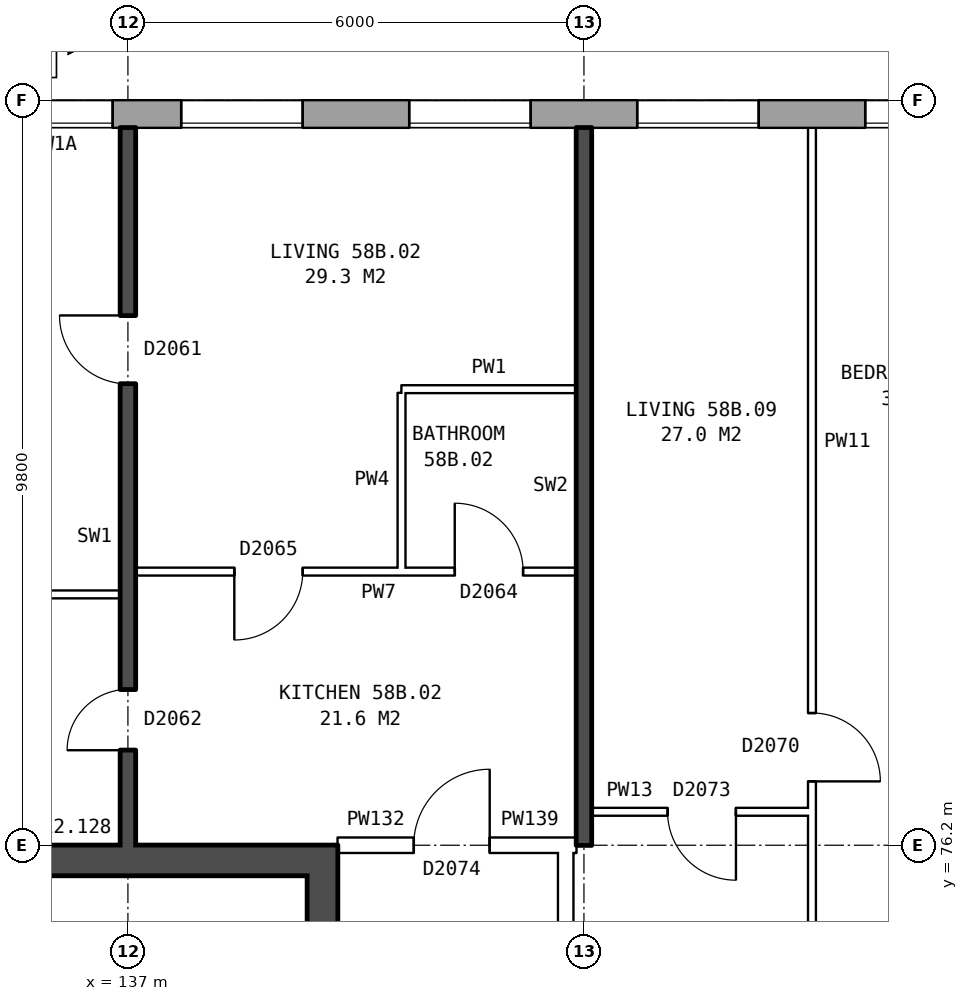
"""IFC4 building model, lengths in metres.
Left out: names, types, materials, properties, quantities, classifications, styles, units other than length and angle.
Written with IfcOpenShell. Run it as: python <this file> out.ifc"""

import sys

from ifc_helpers import new_model, si_unit, direction, frame, frame_2d, origin, place, context, subcontext, project, spatial, rectangle, extrude, element, fill, save


model = new_model("IFC4")
c1 = context("Model", 3, precision=1e-05, world=origin(), true_north=direction((0.0, 1.0)))
c2 = subcontext(c1, "Body", "Model", "MODEL_VIEW")
j1 = project(units=[si_unit("LENGTHUNIT", "METRE"), si_unit("PLANEANGLEUNIT", "RADIAN")], contexts=[c1])
p1 = place(None, origin())
s1 = spatial("IfcSite", under=j1, at=p1, CompositionType="ELEMENT")
p2 = place(p1, origin())
s2 = spatial("IfcBuilding", under=s1, at=p2, CompositionType="ELEMENT")
p3 = place(p2, frame((0.0, 0.0, 205.9)))
s3 = spatial("IfcBuildingStorey", under=s2, at=p3, CompositionType="ELEMENT", Elevation=205.9)
p4 = place(p3, frame((165.925, 85.82, 0.0), z_axis=(0.0, 0.0, 1.0), x_axis=(-1.0, 0.0, 0.0)))
e1 = element("IfcWall", 1, at=p4, inside=s3, PredefinedType="STANDARD", context=c2, shape_type="SweptSolid", body=[
    extrude(rectangle(XDim=33.875, YDim=0.36, at=frame_2d((16.938, 0.0))), origin(), (0.0, 0.0, 1.0), 2.85),
])
p5 = place(p4, frame((2.625, 0.0, 0.8)))
e2 = element("IfcOpeningElement", 2, at=p5, cuts=e1, PredefinedType="OPENING", context=c2, shape_type="SweptSolid", body=[
    extrude(rectangle(XDim=1.6, YDim=1.8, at=frame_2d((0.8, 0.9))), frame((0.0, 0.19, 0.0), z_axis=(0.0, -1.0, 0.0), x_axis=(1.0, 0.0, 0.0)), (0.0, 0.0, 1.0), 0.38),
])
p6 = place(p4, frame((5.625, 0.0, 0.8)))
e3 = element("IfcOpeningElement", 3, at=p6, cuts=e1, PredefinedType="OPENING", context=c2, shape_type="SweptSolid", body=[
    extrude(rectangle(XDim=1.6, YDim=1.8, at=frame_2d((0.8, 0.9))), frame((0.0, 0.19, 0.0), z_axis=(0.0, -1.0, 0.0), x_axis=(1.0, 0.0, 0.0)), (0.0, 0.0, 1.0), 0.38),
])
p7 = place(p4, frame((8.625, 0.0, 0.8)))
e4 = element("IfcOpeningElement", 4, at=p7, cuts=e1, PredefinedType="OPENING", context=c2, shape_type="SweptSolid", body=[
    extrude(rectangle(XDim=1.6, YDim=1.8, at=frame_2d((0.8, 0.9))), frame((0.0, 0.19, 0.0), z_axis=(0.0, -1.0, 0.0), x_axis=(1.0, 0.0, 0.0)), (0.0, 0.0, 1.0), 0.38),
])
p8 = place(p4, frame((11.625, 0.0, 0.8)))
e5 = element("IfcOpeningElement", 5, at=p8, cuts=e1, PredefinedType="OPENING", context=c2, shape_type="SweptSolid", body=[
    extrude(rectangle(XDim=1.6, YDim=1.8, at=frame_2d((0.8, 0.9))), frame((0.0, 0.19, 0.0), z_axis=(0.0, -1.0, 0.0), x_axis=(1.0, 0.0, 0.0)), (0.0, 0.0, 1.0), 0.38),
])
p9 = place(p4, frame((14.625, 0.0, 0.8)))
e6 = element("IfcOpeningElement", 6, at=p9, cuts=e1, PredefinedType="OPENING", context=c2, shape_type="SweptSolid", body=[
    extrude(rectangle(XDim=1.6, YDim=1.8, at=frame_2d((0.8, 0.9))), frame((0.0, 0.19, 0.0), z_axis=(0.0, -1.0, 0.0), x_axis=(1.0, 0.0, 0.0)), (0.0, 0.0, 1.0), 0.38),
])
p10 = place(p4, frame((17.625, 0.0, 0.8)))
e7 = element("IfcOpeningElement", 7, at=p10, cuts=e1, PredefinedType="OPENING", context=c2, shape_type="SweptSolid", body=[
    extrude(rectangle(XDim=1.6, YDim=1.8, at=frame_2d((0.8, 0.9))), frame((0.0, 0.19, 0.0), z_axis=(0.0, -1.0, 0.0), x_axis=(1.0, 0.0, 0.0)), (0.0, 0.0, 1.0), 0.38),
])
p11 = place(p4, frame((20.625, 0.0, 0.8)))
e8 = element("IfcOpeningElement", 8, at=p11, cuts=e1, PredefinedType="OPENING", context=c2, shape_type="SweptSolid", body=[
    extrude(rectangle(XDim=1.6, YDim=1.8, at=frame_2d((0.8, 0.9))), frame((0.0, 0.19, 0.0), z_axis=(0.0, -1.0, 0.0), x_axis=(1.0, 0.0, 0.0)), (0.0, 0.0, 1.0), 0.38),
])
p12 = place(p4, frame((23.625, 0.0, 0.8)))
e9 = element("IfcOpeningElement", 9, at=p12, cuts=e1, PredefinedType="OPENING", context=c2, shape_type="SweptSolid", body=[
    extrude(rectangle(XDim=1.6, YDim=1.8, at=frame_2d((0.8, 0.9))), frame((0.0, 0.19, 0.0), z_axis=(0.0, -1.0, 0.0), x_axis=(1.0, 0.0, 0.0)), (0.0, 0.0, 1.0), 0.38),
])
p13 = place(p4, frame((26.625, 0.0, 0.8)))
e10 = element("IfcOpeningElement", 10, at=p13, cuts=e1, PredefinedType="OPENING", context=c2, shape_type="SweptSolid", body=[
    extrude(rectangle(XDim=1.6, YDim=1.8, at=frame_2d((0.8, 0.9))), frame((0.0, 0.19, 0.0), z_axis=(0.0, -1.0, 0.0), x_axis=(1.0, 0.0, 0.0)), (0.0, 0.0, 1.0), 0.38),
])
p14 = place(p4, frame((29.125, 0.0, 0.8)))
e11 = element("IfcOpeningElement", 11, at=p14, cuts=e1, PredefinedType="OPENING", context=c2, shape_type="SweptSolid", body=[
    extrude(rectangle(XDim=1.4, YDim=1.8, at=frame_2d((0.7, 0.9))), frame((0.0, 0.19, 0.0), z_axis=(0.0, -1.0, 0.0), x_axis=(1.0, 0.0, 0.0)), (0.0, 0.0, 1.0), 0.38),
])
p15 = place(p4, frame((32.625, 0.0, 1.1)))
e12 = element("IfcOpeningElement", 12, at=p15, cuts=e1, PredefinedType="OPENING", context=c2, shape_type="SweptSolid", body=[
    extrude(rectangle(XDim=0.8, YDim=1.5, at=frame_2d((0.4, 0.75))), frame((0.0, 0.19, 0.0), z_axis=(0.0, -1.0, 0.0), x_axis=(1.0, 0.0, 0.0)), (0.0, 0.0, 1.0), 0.38),
])
p16 = place(p3, frame((139.56, 63.8, 0.0), z_axis=(0.0, 0.0, 1.0), x_axis=(0.0, 1.0, 0.0)))
e13 = element("IfcWall", 13, at=p16, inside=s3, PredefinedType="SHEAR", context=c2, shape_type="SweptSolid", body=[
    extrude(rectangle(XDim=12.4, YDim=0.4, at=frame_2d((6.2, 0.0))), origin(), (0.0, 0.0, 1.0), 2.85),
])
p17 = place(p16, frame((1.325, 0.0, 0.0)))
e14 = element("IfcOpeningElement", 14, at=p17, cuts=e13, PredefinedType="OPENING", context=c2, shape_type="SweptSolid", body=[
    extrude(rectangle(XDim=1.1, YDim=2.1, at=frame_2d((0.55, 1.05))), frame((0.0, 0.21, 0.0), z_axis=(0.0, -1.0, 0.0), x_axis=(1.0, 0.0, 0.0)), (0.0, 0.0, 1.0), 0.42),
])
p18 = place(p16, frame((3.6, 0.0, 0.0)))
e15 = element("IfcOpeningElement", 15, at=p18, cuts=e13, PredefinedType="OPENING", context=c2, shape_type="SweptSolid", body=[
    extrude(rectangle(XDim=1.1, YDim=2.1, at=frame_2d((0.55, 1.05))), frame((0.0, 0.21, 0.0), z_axis=(0.0, -1.0, 0.0), x_axis=(1.0, 0.0, 0.0)), (0.0, 0.0, 1.0), 0.42),
])
p19 = place(p16, frame((5.8, 0.0, 0.0)))
e16 = element("IfcOpeningElement", 16, at=p19, cuts=e13, PredefinedType="OPENING", context=c2, shape_type="SweptSolid", body=[
    extrude(rectangle(XDim=1.1, YDim=2.1, at=frame_2d((0.55, 1.05))), frame((0.0, 0.21, 0.0), z_axis=(0.0, -1.0, 0.0), x_axis=(1.0, 0.0, 0.0)), (0.0, 0.0, 1.0), 0.42),
])
p20 = place(p16, frame((9.9, 0.0, 0.0)))
e17 = element("IfcOpeningElement", 17, at=p20, cuts=e13, PredefinedType="OPENING", context=c2, shape_type="SweptSolid", body=[
    extrude(rectangle(XDim=1.1, YDim=2.1, at=frame_2d((0.55, 1.05))), frame((0.0, 0.21, 0.0), z_axis=(0.0, -1.0, 0.0), x_axis=(1.0, 0.0, 0.0)), (0.0, 0.0, 1.0), 0.42),
])
p21 = place(p16, frame((8.125, 0.0, 0.0)))
e18 = element("IfcOpeningElement", 18, at=p21, cuts=e13, PredefinedType="OPENING", context=c2, shape_type="SweptSolid", body=[
    extrude(rectangle(XDim=0.85, YDim=2.1, at=frame_2d((0.425, 1.05))), frame((0.0, 0.21, 0.0), z_axis=(0.0, -1.0, 0.0), x_axis=(1.0, 0.0, 0.0)), (0.0, 0.0, 1.0), 0.42),
])
p22 = place(p3, frame((139.36, 76.0, 0.0), z_axis=(0.0, 0.0, 1.0), x_axis=(-1.0, 0.0, 0.0)))
e19 = element("IfcWall", 19, at=p22, inside=s3, PredefinedType="SHEAR", context=c2, shape_type="SweptSolid", body=[
    extrude(rectangle(XDim=7.6, YDim=0.4, at=frame_2d((3.8, 0.0))), origin(), (0.0, 0.0, 1.0), 2.85),
])
p23 = place(p3, frame((142.76, 63.9, 0.0), z_axis=(0.0, 0.0, 1.0), x_axis=(0.0, 1.0, 0.0)))
e20 = element("IfcWall", 20, at=p23, inside=s3, PredefinedType="PARTITIONING", context=c2, shape_type="SweptSolid", body=[
    extrude(rectangle(XDim=12.2, YDim=0.2, at=frame_2d((6.1, 0.0))), origin(), (0.0, 0.0, 1.0), 2.85),
])
p24 = place(p23, frame((5.1, 0.0, 0.0)))
e21 = element("IfcOpeningElement", 21, at=p24, cuts=e20, PredefinedType="OPENING", context=c2, shape_type="SweptSolid", body=[
    extrude(rectangle(XDim=2.0, YDim=2.1, at=frame_2d((1.0, 1.05))), frame((0.0, 0.11, 0.0), z_axis=(0.0, -1.0, 0.0), x_axis=(1.0, 0.0, 0.0)), (0.0, 0.0, 1.0), 0.22),
])
p25 = place(p3, frame((139.76, 76.2, 0.0), z_axis=(0.0, 0.0, 1.0), x_axis=(1.0, 0.0, 0.0)))
e22 = element("IfcWall", 22, at=p25, inside=s3, PredefinedType="PARTITIONING", context=c2, shape_type="SweptSolid", body=[
    extrude(rectangle(XDim=3.0, YDim=0.2, at=frame_2d((1.5, 0.0))), origin(), (0.0, 0.0, 1.0), 2.85),
])
p26 = place(p25, frame((1.0, 0.0, 0.0)))
e23 = element("IfcOpeningElement", 23, at=p26, cuts=e22, PredefinedType="OPENING", context=c2, shape_type="SweptSolid", body=[
    extrude(rectangle(XDim=1.0, YDim=2.1, at=frame_2d((0.5, 1.05))), frame((0.0, 0.11, 0.0), z_axis=(0.0, -1.0, 0.0), x_axis=(1.0, 0.0, 0.0)), (0.0, 0.0, 1.0), 0.22),
])
p27 = place(p3, frame((142.76, 76.2, 0.0), z_axis=(0.0, 0.0, 1.0), x_axis=(1.0, 0.0, 0.0)))
e24 = element("IfcWall", 24, at=p27, inside=s3, PredefinedType="PARTITIONING", context=c2, shape_type="SweptSolid", body=[
    extrude(rectangle(XDim=0.14, YDim=0.2, at=frame_2d((0.07, 0.0))), origin(), (0.0, 0.0, 1.0), 2.85),
])
p28 = place(p3, frame((143.1, 76.64, 0.0), z_axis=(0.0, 0.0, 1.0), x_axis=(1.0, 0.0, 0.0)))
e25 = element("IfcWall", 25, at=p28, inside=s3, PredefinedType="PARTITIONING", context=c2, shape_type="SweptSolid", body=[
    extrude(rectangle(XDim=2.9, YDim=0.1, at=frame_2d((1.45, 0.0))), origin(), (0.0, 0.0, 1.0), 2.85),
])
p29 = place(p28, frame((1.0, 0.0, 0.0)))
e26 = element("IfcOpeningElement", 26, at=p29, cuts=e25, PredefinedType="OPENING", context=c2, shape_type="SweptSolid", body=[
    extrude(rectangle(XDim=0.9, YDim=2.1, at=frame_2d((0.45, 1.05))), frame((0.0, 0.06, 0.0), z_axis=(0.0, -1.0, 0.0), x_axis=(1.0, 0.0, 0.0)), (0.0, 0.0, 1.0), 0.12),
])
p30 = place(p3, frame((131.1, 79.5, 0.0), z_axis=(0.0, 0.0, 1.0), x_axis=(1.0, 0.0, 0.0)))
e27 = element("IfcWall", 27, at=p30, inside=s3, PredefinedType="PARTITIONING", context=c2, shape_type="SweptSolid", body=[
    extrude(rectangle(XDim=5.8, YDim=0.1, at=frame_2d((2.9, 0.0))), origin(), (0.0, 0.0, 1.0), 2.85),
])
p31 = place(p3, frame((137.1, 79.8, 0.0), z_axis=(0.0, 0.0, 1.0), x_axis=(1.0, 0.0, 0.0)))
e28 = element("IfcWall", 28, at=p31, inside=s3, PredefinedType="PARTITIONING", context=c2, shape_type="SweptSolid", body=[
    extrude(rectangle(XDim=5.8, YDim=0.1, at=frame_2d((2.9, 0.0))), origin(), (0.0, 0.0, 1.0), 2.85),
])
p32 = place(p31, frame((1.3, 0.0, 0.0)))
e29 = element("IfcOpeningElement", 29, at=p32, cuts=e28, PredefinedType="OPENING", context=c2, shape_type="SweptSolid", body=[
    extrude(rectangle(XDim=0.9, YDim=2.1, at=frame_2d((0.45, 1.05))), frame((0.0, 0.06, 0.0), z_axis=(0.0, -1.0, 0.0), x_axis=(1.0, 0.0, 0.0)), (0.0, 0.0, 1.0), 0.12),
])
p33 = place(p31, frame((4.2, 0.0, 0.0)))
e30 = element("IfcOpeningElement", 30, at=p33, cuts=e28, PredefinedType="OPENING", context=c2, shape_type="SweptSolid", body=[
    extrude(rectangle(XDim=0.9, YDim=2.1, at=frame_2d((0.45, 1.05))), frame((0.0, 0.06, 0.0), z_axis=(0.0, -1.0, 0.0), x_axis=(1.0, 0.0, 0.0)), (0.0, 0.0, 1.0), 0.12),
])
p34 = place(p3, frame((140.6, 82.2, 0.0), z_axis=(0.0, 0.0, 1.0), x_axis=(1.0, 0.0, 0.0)))
e31 = element("IfcWall", 31, at=p34, inside=s3, PredefinedType="PARTITIONING", context=c2, shape_type="SweptSolid", body=[
    extrude(rectangle(XDim=2.3, YDim=0.1, at=frame_2d((1.15, 0.0))), origin(), (0.0, 0.0, 1.0), 2.85),
])
p35 = place(p3, frame((137.0, 76.2, 0.0), z_axis=(0.0, 0.0, 1.0), x_axis=(0.0, 1.0, 0.0)))
e32 = element("IfcWall", 32, at=p35, inside=s3, PredefinedType="SOLIDWALL", context=c2, shape_type="SweptSolid", body=[
    extrude(rectangle(XDim=9.44, YDim=0.2, at=frame_2d((4.72, 0.0))), origin(), (0.0, 0.0, 1.0), 2.85),
])
p36 = place(p35, frame((6.07, 0.0, 0.0)))
e33 = element("IfcOpeningElement", 33, at=p36, cuts=e32, PredefinedType="OPENING", context=c2, shape_type="SweptSolid", body=[
    extrude(rectangle(XDim=0.9, YDim=2.1, at=frame_2d((0.45, 1.05))), frame((0.0, 0.11, 0.0), z_axis=(0.0, -1.0, 0.0), x_axis=(1.0, 0.0, 0.0)), (0.0, 0.0, 1.0), 0.22),
])
p37 = place(p35, frame((1.25, 0.0, 0.0)))
e34 = element("IfcOpeningElement", 34, at=p37, cuts=e32, PredefinedType="OPENING", context=c2, shape_type="SweptSolid", body=[
    extrude(rectangle(XDim=0.8, YDim=2.1, at=frame_2d((0.4, 1.05))), frame((0.0, 0.11, 0.0), z_axis=(0.0, -1.0, 0.0), x_axis=(1.0, 0.0, 0.0)), (0.0, 0.0, 1.0), 0.22),
])
p38 = place(p3, frame((140.6, 79.85, 0.0), z_axis=(0.0, 0.0, 1.0), x_axis=(0.0, 1.0, 0.0)))
e35 = element("IfcWall", 35, at=p38, inside=s3, PredefinedType="PARTITIONING", context=c2, shape_type="SweptSolid", body=[
    extrude(rectangle(XDim=2.3, YDim=0.1, at=frame_2d((1.15, 0.0))), origin(), (0.0, 0.0, 1.0), 2.85),
])
p39 = place(p3, frame((143.0, 76.2, 0.0), z_axis=(0.0, 0.0, 1.0), x_axis=(0.0, 1.0, 0.0)))
e36 = element("IfcWall", 36, at=p39, inside=s3, PredefinedType="SOLIDWALL", context=c2, shape_type="SweptSolid", body=[
    extrude(rectangle(XDim=9.44, YDim=0.2, at=frame_2d((4.72, 0.0))), origin(), (0.0, 0.0, 1.0), 2.85),
])
p40 = place(p3, frame((146.0, 71.3, 0.0), z_axis=(0.0, 0.0, 1.0), x_axis=(0.0, 1.0, 0.0)))
e37 = element("IfcWall", 37, at=p40, inside=s3, PredefinedType="PARTITIONING", context=c2, shape_type="SweptSolid", body=[
    extrude(rectangle(XDim=14.34, YDim=0.1, at=frame_2d((7.17, 0.0))), origin(), (0.0, 0.0, 1.0), 2.85),
])
p41 = place(p40, frame((5.74, 0.0, 0.0)))
e38 = element("IfcOpeningElement", 38, at=p41, cuts=e37, PredefinedType="OPENING", context=c2, shape_type="SweptSolid", body=[
    extrude(rectangle(XDim=0.9, YDim=2.1, at=frame_2d((0.45, 1.05))), frame((0.0, 0.06, 0.0), z_axis=(0.0, -1.0, 0.0), x_axis=(1.0, 0.0, 0.0)), (0.0, 0.0, 1.0), 0.12),
])
p42 = place(p40, frame((0.4, 0.0, 0.0)))
e39 = element("IfcOpeningElement", 39, at=p42, cuts=e37, PredefinedType="OPENING", context=c2, shape_type="SweptSolid", body=[
    extrude(rectangle(XDim=0.9, YDim=2.1, at=frame_2d((0.45, 1.05))), frame((0.0, 0.06, 0.0), z_axis=(0.0, -1.0, 0.0), x_axis=(1.0, 0.0, 0.0)), (0.0, 0.0, 1.0), 0.12),
])
p43 = place(p10, origin())
e40 = element("IfcWindow", 40, at=p43, inside=s3, PartitioningType="SINGLE_PANEL", PredefinedType="WINDOW", context=c2, shape_type="SweptSolid", body=[
    extrude(rectangle(XDim=1.6, YDim=1.8, at=frame_2d((0.8, 0.9))), frame((0.0, 0.15, 0.0), z_axis=(0.0, -1.0, 0.0), x_axis=(1.0, 0.0, 0.0)), (0.0, 0.0, 1.0), 0.06),
])
fill(e7, e40)
p44 = place(p11, origin())
e41 = element("IfcWindow", 41, at=p44, inside=s3, PartitioningType="SINGLE_PANEL", PredefinedType="WINDOW", context=c2, shape_type="SweptSolid", body=[
    extrude(rectangle(XDim=1.6, YDim=1.8, at=frame_2d((0.8, 0.9))), frame((0.0, 0.15, 0.0), z_axis=(0.0, -1.0, 0.0), x_axis=(1.0, 0.0, 0.0)), (0.0, 0.0, 1.0), 0.06),
])
fill(e8, e41)
p45 = place(p12, origin())
e42 = element("IfcWindow", 42, at=p45, inside=s3, PartitioningType="SINGLE_PANEL", PredefinedType="WINDOW", context=c2, shape_type="SweptSolid", body=[
    extrude(rectangle(XDim=1.6, YDim=1.8, at=frame_2d((0.8, 0.9))), frame((0.0, 0.15, 0.0), z_axis=(0.0, -1.0, 0.0), x_axis=(1.0, 0.0, 0.0)), (0.0, 0.0, 1.0), 0.06),
])
fill(e9, e42)
p46 = place(p13, origin())
e43 = element("IfcWindow", 43, at=p46, inside=s3, PartitioningType="SINGLE_PANEL", PredefinedType="WINDOW", context=c2, shape_type="SweptSolid", body=[
    extrude(rectangle(XDim=1.6, YDim=1.8, at=frame_2d((0.8, 0.9))), frame((0.0, 0.15, 0.0), z_axis=(0.0, -1.0, 0.0), x_axis=(1.0, 0.0, 0.0)), (0.0, 0.0, 1.0), 0.06),
])
fill(e10, e43)
p47 = place(p14, origin())
e44 = element("IfcWindow", 44, at=p47, inside=s3, PartitioningType="SINGLE_PANEL", PredefinedType="WINDOW", context=c2, shape_type="SweptSolid", body=[
    extrude(rectangle(XDim=1.4, YDim=1.8, at=frame_2d((0.7, 0.9))), frame((0.0, 0.15, 0.0), z_axis=(0.0, -1.0, 0.0), x_axis=(1.0, 0.0, 0.0)), (0.0, 0.0, 1.0), 0.06),
])
fill(e11, e44)
p48 = place(p36, origin())
e45 = element("IfcDoor", 45, at=p48, inside=s3, OperationType="SINGLE_SWING_RIGHT", PredefinedType="DOOR", context=c2, shape_type="SweptSolid", body=[
    extrude(rectangle(XDim=0.9, YDim=2.1, at=frame_2d((0.45, 1.05))), frame((0.0, 0.025, 0.0), z_axis=(0.0, -1.0, 0.0), x_axis=(1.0, 0.0, 0.0)), (0.0, 0.0, 1.0), 0.05),
])
fill(e33, e45)
p49 = place(p26, origin())
e46 = element("IfcDoor", 46, at=p49, inside=s3, OperationType="SINGLE_SWING_RIGHT", PredefinedType="DOOR", context=c2, shape_type="SweptSolid", body=[
    extrude(rectangle(XDim=1.0, YDim=2.1, at=frame_2d((0.5, 1.05))), frame((0.0, 0.025, 0.0), z_axis=(0.0, -1.0, 0.0), x_axis=(1.0, 0.0, 0.0)), (0.0, 0.0, 1.0), 0.05),
])
fill(e23, e46)
p50 = place(p32, frame((0.9, 0.0, 0.0), z_axis=(0.0, 0.0, 1.0), x_axis=(-1.0, 0.0, 0.0)))
e47 = element("IfcDoor", 47, at=p50, inside=s3, OperationType="SINGLE_SWING_RIGHT", PredefinedType="DOOR", context=c2, shape_type="SweptSolid", body=[
    extrude(rectangle(XDim=0.9, YDim=2.1, at=frame_2d((0.45, 1.05))), frame((0.0, 0.025, 0.0), z_axis=(0.0, -1.0, 0.0), x_axis=(1.0, 0.0, 0.0)), (0.0, 0.0, 1.0), 0.05),
])
fill(e29, e47)
p51 = place(p37, origin())
e48 = element("IfcDoor", 48, at=p51, inside=s3, OperationType="SINGLE_SWING_LEFT", PredefinedType="DOOR", context=c2, shape_type="SweptSolid", body=[
    extrude(rectangle(XDim=0.8, YDim=2.1, at=frame_2d((0.4, 1.05))), frame((0.0, 0.025, 0.0), z_axis=(0.0, -1.0, 0.0), x_axis=(1.0, 0.0, 0.0)), (0.0, 0.0, 1.0), 0.05),
])
fill(e34, e48)
p52 = place(p33, origin())
e49 = element("IfcDoor", 49, at=p52, inside=s3, OperationType="SINGLE_SWING_LEFT", PredefinedType="DOOR", context=c2, shape_type="SweptSolid", body=[
    extrude(rectangle(XDim=0.9, YDim=2.1, at=frame_2d((0.45, 1.05))), frame((0.0, 0.025, 0.0), z_axis=(0.0, -1.0, 0.0), x_axis=(1.0, 0.0, 0.0)), (0.0, 0.0, 1.0), 0.05),
])
fill(e30, e49)
p53 = place(p41, frame((0.9, 0.0, 0.0), z_axis=(0.0, 0.0, 1.0), x_axis=(-1.0, 0.0, 0.0)))
e50 = element("IfcDoor", 50, at=p53, inside=s3, OperationType="SINGLE_SWING_RIGHT", PredefinedType="DOOR", context=c2, shape_type="SweptSolid", body=[
    extrude(rectangle(XDim=0.9, YDim=2.1, at=frame_2d((0.45, 1.05))), frame((0.0, 0.025, 0.0), z_axis=(0.0, -1.0, 0.0), x_axis=(1.0, 0.0, 0.0)), (0.0, 0.0, 1.0), 0.05),
])
fill(e38, e50)
p54 = place(p29, frame((0.9, 0.0, 0.0), z_axis=(0.0, 0.0, 1.0), x_axis=(-1.0, 0.0, 0.0)))
e51 = element("IfcDoor", 51, at=p54, inside=s3, OperationType="SINGLE_SWING_LEFT", PredefinedType="DOOR", context=c2, shape_type="SweptSolid", body=[
    extrude(rectangle(XDim=0.9, YDim=2.1, at=frame_2d((0.45, 1.05))), frame((0.0, 0.025, 0.0), z_axis=(0.0, -1.0, 0.0), x_axis=(1.0, 0.0, 0.0)), (0.0, 0.0, 1.0), 0.05),
])
fill(e26, e51)
save(model, sys.argv[1])
